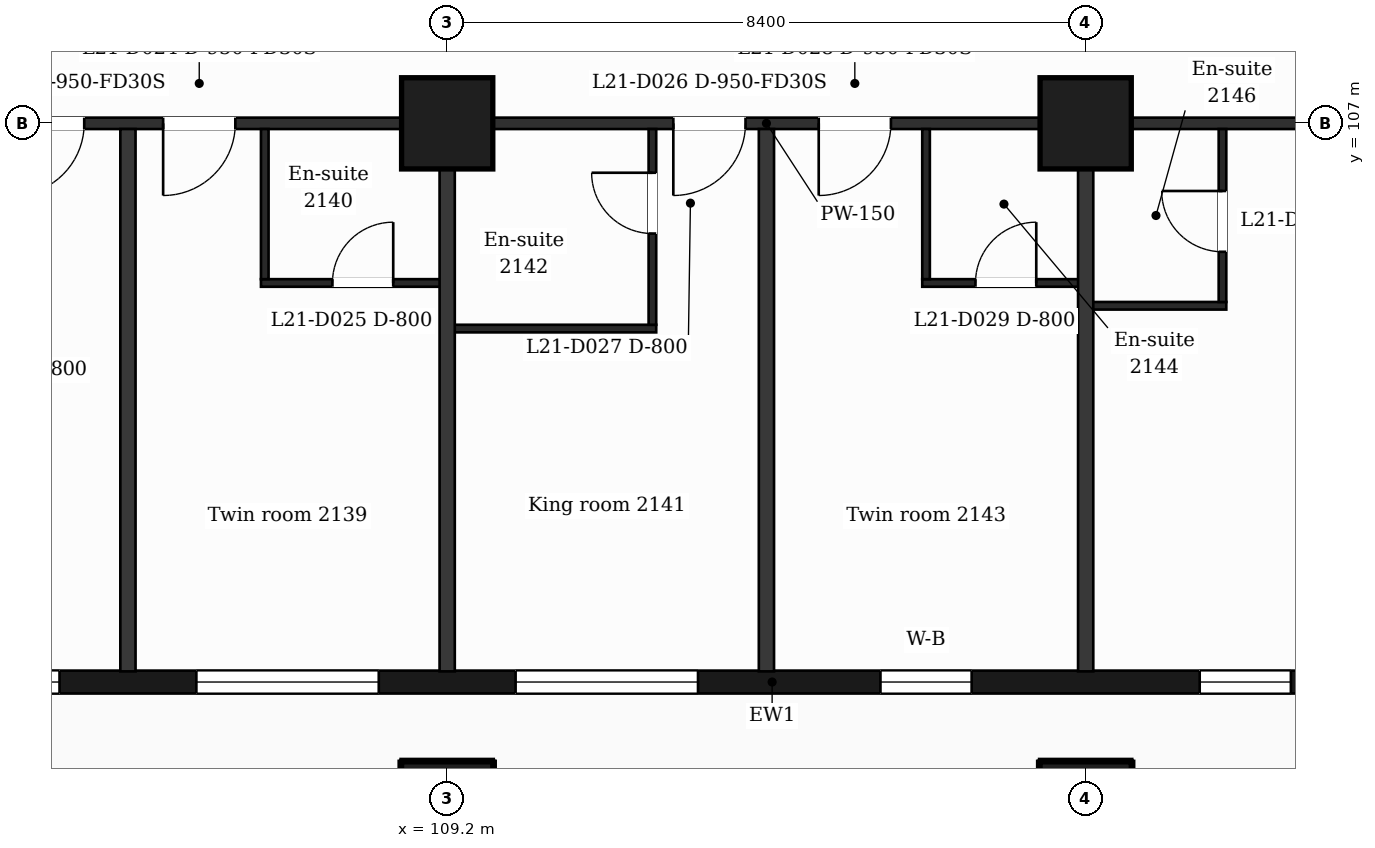
"""IFC4 building model, lengths in metres.
Left out: names, types, materials, properties, quantities, classifications, styles, units other than length and angle.
Written with IfcOpenShell. Run it as: python <this file> out.ifc"""

import sys

from ifc_helpers import new_model, si_unit, direction, frame, frame_2d, origin, origin_2d, place, context, subcontext, project, spatial, rectangle, extrude, element, fill, save


model = new_model("IFC4")
c1 = context("Model", 3, precision=1e-05, world=origin(), true_north=direction((0.0, 1.0)))
c2 = subcontext(c1, "Body", "Model", "MODEL_VIEW")
j1 = project(units=[si_unit("LENGTHUNIT", "METRE"), si_unit("PLANEANGLEUNIT", "RADIAN")], contexts=[c1])
p1 = place(None, origin())
s1 = spatial("IfcSite", under=j1, at=p1, CompositionType="ELEMENT")
p2 = place(p1, origin())
s2 = spatial("IfcBuilding", under=s1, at=p2, CompositionType="ELEMENT")
p3 = place(p2, frame((0.0, 0.0, 94.7)))
s3 = spatial("IfcBuildingStorey", under=s2, at=p3, CompositionType="ELEMENT", Elevation=94.7)
for number, where, z_axis, x_axis in (
    (1, (109.2, 98.0, 0.0), (0.0, 0.0, 1.0), (1.0, 0.0, 0.0)),
    (2, (117.6, 98.0, 0.0), (0.0, 0.0, 1.0), (1.0, 0.0, 0.0)),
    (3, (109.2, 107.0, 0.0), (0.0, 0.0, 1.0), (1.0, 0.0, 0.0)),
    (4, (117.6, 107.0, 0.0), (0.0, 0.0, 1.0), (1.0, 0.0, 0.0)),
):
    element("IfcColumn", number, at=place(p3, frame(where, z_axis=z_axis, x_axis=x_axis)), inside=s3, PredefinedType="COLUMN", context=c2, shape_type="SweptSolid", body=[
        extrude(rectangle(XDim=1.2, YDim=1.2, at=origin_2d()), origin(), (0.0, 0.0, 1.0), 3.7),
    ])
p4 = place(p3, frame((89.85, 99.65, 0.0), z_axis=(0.0, 0.0, 1.0), x_axis=(1.0, 0.0, 0.0)))
e5 = element("IfcWall", 5, at=p4, inside=s3, PredefinedType="SOLIDWALL", context=c2, shape_type="SweptSolid", body=[
    extrude(rectangle(XDim=47.25, YDim=0.3, at=frame_2d((23.625, 0.0))), origin(), (0.0, 0.0, 1.0), 3.38),
])
p5 = place(p4, frame((0.725, 0.0, 0.9)))
e6 = element("IfcOpeningElement", 6, at=p5, cuts=e5, PredefinedType="OPENING", context=c2, shape_type="SweptSolid", body=[
    extrude(rectangle(XDim=1.2, YDim=2.1, at=frame_2d((0.6, 1.05))), frame((0.0, 0.16, 0.0), z_axis=(0.0, -1.0, 0.0), x_axis=(1.0, 0.0, 0.0)), (0.0, 0.0, 1.0), 0.32),
])
p6 = place(p4, frame((3.45, 0.0, 0.9)))
e7 = element("IfcOpeningElement", 7, at=p6, cuts=e5, PredefinedType="OPENING", context=c2, shape_type="SweptSolid", body=[
    extrude(rectangle(XDim=2.4, YDim=2.1, at=frame_2d((1.2, 1.05))), frame((0.0, 0.16, 0.0), z_axis=(0.0, -1.0, 0.0), x_axis=(1.0, 0.0, 0.0)), (0.0, 0.0, 1.0), 0.32),
])
p7 = place(p4, frame((7.65, 0.0, 0.9)))
e8 = element("IfcOpeningElement", 8, at=p7, cuts=e5, PredefinedType="OPENING", context=c2, shape_type="SweptSolid", body=[
    extrude(rectangle(XDim=2.4, YDim=2.1, at=frame_2d((1.2, 1.05))), frame((0.0, 0.16, 0.0), z_axis=(0.0, -1.0, 0.0), x_axis=(1.0, 0.0, 0.0)), (0.0, 0.0, 1.0), 0.32),
])
p8 = place(p4, frame((11.85, 0.0, 0.9)))
e9 = element("IfcOpeningElement", 9, at=p8, cuts=e5, PredefinedType="OPENING", context=c2, shape_type="SweptSolid", body=[
    extrude(rectangle(XDim=2.4, YDim=2.1, at=frame_2d((1.2, 1.05))), frame((0.0, 0.16, 0.0), z_axis=(0.0, -1.0, 0.0), x_axis=(1.0, 0.0, 0.0)), (0.0, 0.0, 1.0), 0.32),
])
p9 = place(p4, frame((16.05, 0.0, 0.9)))
e10 = element("IfcOpeningElement", 10, at=p9, cuts=e5, PredefinedType="OPENING", context=c2, shape_type="SweptSolid", body=[
    extrude(rectangle(XDim=2.4, YDim=2.1, at=frame_2d((1.2, 1.05))), frame((0.0, 0.16, 0.0), z_axis=(0.0, -1.0, 0.0), x_axis=(1.0, 0.0, 0.0)), (0.0, 0.0, 1.0), 0.32),
])
p10 = place(p4, frame((20.25, 0.0, 0.9)))
e11 = element("IfcOpeningElement", 11, at=p10, cuts=e5, PredefinedType="OPENING", context=c2, shape_type="SweptSolid", body=[
    extrude(rectangle(XDim=2.4, YDim=2.1, at=frame_2d((1.2, 1.05))), frame((0.0, 0.16, 0.0), z_axis=(0.0, -1.0, 0.0), x_axis=(1.0, 0.0, 0.0)), (0.0, 0.0, 1.0), 0.32),
])
p11 = place(p4, frame((25.05, 0.0, 0.9)))
e12 = element("IfcOpeningElement", 12, at=p11, cuts=e5, PredefinedType="OPENING", context=c2, shape_type="SweptSolid", body=[
    extrude(rectangle(XDim=1.2, YDim=2.1, at=frame_2d((0.6, 1.05))), frame((0.0, 0.16, 0.0), z_axis=(0.0, -1.0, 0.0), x_axis=(1.0, 0.0, 0.0)), (0.0, 0.0, 1.0), 0.32),
])
p12 = place(p4, frame((29.25, 0.0, 0.9)))
e13 = element("IfcOpeningElement", 13, at=p12, cuts=e5, PredefinedType="OPENING", context=c2, shape_type="SweptSolid", body=[
    extrude(rectangle(XDim=1.2, YDim=2.1, at=frame_2d((0.6, 1.05))), frame((0.0, 0.16, 0.0), z_axis=(0.0, -1.0, 0.0), x_axis=(1.0, 0.0, 0.0)), (0.0, 0.0, 1.0), 0.32),
])
p13 = place(p4, frame((32.55, 0.0, 0.0)))
e14 = element("IfcOpeningElement", 14, at=p13, cuts=e5, PredefinedType="OPENING", context=c2, shape_type="SweptSolid", body=[
    extrude(rectangle(XDim=1.2, YDim=2.4, at=frame_2d((0.6, 1.2))), frame((0.0, 0.16, 0.0), z_axis=(0.0, -1.0, 0.0), x_axis=(1.0, 0.0, 0.0)), (0.0, 0.0, 1.0), 0.32),
])
p14 = place(p4, frame((34.35, 0.0, 0.9)))
e15 = element("IfcOpeningElement", 15, at=p14, cuts=e5, PredefinedType="OPENING", context=c2, shape_type="SweptSolid", body=[
    extrude(rectangle(XDim=1.2, YDim=2.1, at=frame_2d((0.6, 1.05))), frame((0.0, 0.16, 0.0), z_axis=(0.0, -1.0, 0.0), x_axis=(1.0, 0.0, 0.0)), (0.0, 0.0, 1.0), 0.32),
])
p15 = place(p4, frame((37.05, 0.0, 0.9)))
e16 = element("IfcOpeningElement", 16, at=p15, cuts=e5, PredefinedType="OPENING", context=c2, shape_type="SweptSolid", body=[
    extrude(rectangle(XDim=2.4, YDim=2.1, at=frame_2d((1.2, 1.05))), frame((0.0, 0.16, 0.0), z_axis=(0.0, -1.0, 0.0), x_axis=(1.0, 0.0, 0.0)), (0.0, 0.0, 1.0), 0.32),
])
p16 = place(p4, frame((40.95, 0.0, 0.0)))
e17 = element("IfcOpeningElement", 17, at=p16, cuts=e5, PredefinedType="OPENING", context=c2, shape_type="SweptSolid", body=[
    extrude(rectangle(XDim=1.2, YDim=2.4, at=frame_2d((0.6, 1.2))), frame((0.0, 0.16, 0.0), z_axis=(0.0, -1.0, 0.0), x_axis=(1.0, 0.0, 0.0)), (0.0, 0.0, 1.0), 0.32),
])
p17 = place(p4, frame((42.75, 0.0, 0.9)))
e18 = element("IfcOpeningElement", 18, at=p17, cuts=e5, PredefinedType="OPENING", context=c2, shape_type="SweptSolid", body=[
    extrude(rectangle(XDim=1.2, YDim=2.1, at=frame_2d((0.6, 1.05))), frame((0.0, 0.16, 0.0), z_axis=(0.0, -1.0, 0.0), x_axis=(1.0, 0.0, 0.0)), (0.0, 0.0, 1.0), 0.32),
])
p18 = place(p4, frame((45.25, 0.0, 0.9)))
e19 = element("IfcOpeningElement", 19, at=p18, cuts=e5, PredefinedType="OPENING", context=c2, shape_type="SweptSolid", body=[
    extrude(rectangle(XDim=1.2, YDim=2.1, at=frame_2d((0.6, 1.05))), frame((0.0, 0.16, 0.0), z_axis=(0.0, -1.0, 0.0), x_axis=(1.0, 0.0, 0.0)), (0.0, 0.0, 1.0), 0.32),
])
p19 = place(p3, frame((109.2, 104.3, 0.0), z_axis=(0.0, 0.0, 1.0), x_axis=(1.0, 0.0, 0.0)))
e20 = element("IfcWall", 20, at=p19, inside=s3, PredefinedType="PARTITIONING", context=c2, shape_type="SweptSolid", body=[
    extrude(rectangle(XDim=2.75, YDim=0.1, at=frame_2d((1.375, 0.0))), origin(), (0.0, 0.0, 1.0), 3.38),
])
p20 = place(p3, frame((117.6, 104.6, 0.0), z_axis=(0.0, 0.0, 1.0), x_axis=(1.0, 0.0, 0.0)))
e21 = element("IfcWall", 21, at=p20, inside=s3, PredefinedType="PARTITIONING", context=c2, shape_type="SweptSolid", body=[
    extrude(rectangle(XDim=1.85, YDim=0.1, at=frame_2d((0.925, 0.0))), origin(), (0.0, 0.0, 1.0), 3.38),
])
p21 = place(p3, frame((106.75, 104.9, 0.0), z_axis=(0.0, 0.0, 1.0), x_axis=(1.0, 0.0, 0.0)))
e22 = element("IfcWall", 22, at=p21, inside=s3, PredefinedType="PARTITIONING", context=c2, shape_type="SweptSolid", body=[
    extrude(rectangle(XDim=2.45, YDim=0.1, at=frame_2d((1.225, 0.0))), origin(), (0.0, 0.0, 1.0), 3.38),
])
p22 = place(p21, frame((0.94, 0.0, 0.0)))
e23 = element("IfcOpeningElement", 23, at=p22, cuts=e22, PredefinedType="OPENING", context=c2, shape_type="SweptSolid", body=[
    extrude(rectangle(XDim=0.8, YDim=2.1, at=frame_2d((0.4, 1.05))), frame((0.0, 0.06, 0.0), z_axis=(0.0, -1.0, 0.0), x_axis=(1.0, 0.0, 0.0)), (0.0, 0.0, 1.0), 0.12),
])
p23 = place(p3, frame((115.45, 104.9, 0.0), z_axis=(0.0, 0.0, 1.0), x_axis=(1.0, 0.0, 0.0)))
e24 = element("IfcWall", 24, at=p23, inside=s3, PredefinedType="PARTITIONING", context=c2, shape_type="SweptSolid", body=[
    extrude(rectangle(XDim=2.15, YDim=0.1, at=frame_2d((1.075, 0.0))), origin(), (0.0, 0.0, 1.0), 3.38),
])
p24 = place(p23, frame((0.7, 0.0, 0.0)))
e25 = element("IfcOpeningElement", 25, at=p24, cuts=e24, PredefinedType="OPENING", context=c2, shape_type="SweptSolid", body=[
    extrude(rectangle(XDim=0.8, YDim=2.1, at=frame_2d((0.4, 1.05))), frame((0.0, 0.06, 0.0), z_axis=(0.0, -1.0, 0.0), x_axis=(1.0, 0.0, 0.0)), (0.0, 0.0, 1.0), 0.12),
])
p25 = place(p3, frame((87.018, 107.0, 0.0), z_axis=(0.0, 0.0, 1.0), x_axis=(1.0, 0.0, 0.0)))
e26 = element("IfcWall", 26, at=p25, inside=s3, PredefinedType="PARTITIONING", context=c2, shape_type="SweptSolid", body=[
    extrude(rectangle(XDim=52.765, YDim=0.15, at=frame_2d((26.382, 0.0))), origin(), (0.0, 0.0, 1.0), 3.38),
])
p26 = place(p25, frame((0.707, 0.0, 0.0)))
e27 = element("IfcOpeningElement", 27, at=p26, cuts=e26, PredefinedType="OPENING", context=c2, shape_type="SweptSolid", body=[
    extrude(rectangle(XDim=0.95, YDim=2.1, at=frame_2d((0.475, 1.05))), frame((0.0, 0.085, 0.0), z_axis=(0.0, -1.0, 0.0), x_axis=(1.0, 0.0, 0.0)), (0.0, 0.0, 1.0), 0.17),
])
p27 = place(p25, frame((6.982, 0.0, 0.0)))
e28 = element("IfcOpeningElement", 28, at=p27, cuts=e26, PredefinedType="OPENING", context=c2, shape_type="SweptSolid", body=[
    extrude(rectangle(XDim=1.0, YDim=2.1, at=frame_2d((0.5, 1.05))), frame((0.0, 0.085, 0.0), z_axis=(0.0, -1.0, 0.0), x_axis=(1.0, 0.0, 0.0)), (0.0, 0.0, 1.0), 0.17),
])
p28 = place(p25, frame((16.457, 0.0, 0.0)))
e29 = element("IfcOpeningElement", 29, at=p28, cuts=e26, PredefinedType="OPENING", context=c2, shape_type="SweptSolid", body=[
    extrude(rectangle(XDim=0.95, YDim=2.1, at=frame_2d((0.475, 1.05))), frame((0.0, 0.085, 0.0), z_axis=(0.0, -1.0, 0.0), x_axis=(1.0, 0.0, 0.0)), (0.0, 0.0, 1.0), 0.17),
])
p29 = place(p25, frame((18.445, 0.0, 0.0)))
e30 = element("IfcOpeningElement", 30, at=p29, cuts=e26, PredefinedType="OPENING", context=c2, shape_type="SweptSolid", body=[
    extrude(rectangle(XDim=0.95, YDim=2.1, at=frame_2d((0.475, 1.05))), frame((0.0, 0.085, 0.0), z_axis=(0.0, -1.0, 0.0), x_axis=(1.0, 0.0, 0.0)), (0.0, 0.0, 1.0), 0.17),
])
p30 = place(p25, frame((25.157, 0.0, 0.0)))
e31 = element("IfcOpeningElement", 31, at=p30, cuts=e26, PredefinedType="OPENING", context=c2, shape_type="SweptSolid", body=[
    extrude(rectangle(XDim=0.95, YDim=2.1, at=frame_2d((0.475, 1.05))), frame((0.0, 0.085, 0.0), z_axis=(0.0, -1.0, 0.0), x_axis=(1.0, 0.0, 0.0)), (0.0, 0.0, 1.0), 0.17),
])
p31 = place(p25, frame((27.07, 0.0, 0.0)))
e32 = element("IfcOpeningElement", 32, at=p31, cuts=e26, PredefinedType="OPENING", context=c2, shape_type="SweptSolid", body=[
    extrude(rectangle(XDim=0.95, YDim=2.1, at=frame_2d((0.475, 1.05))), frame((0.0, 0.085, 0.0), z_axis=(0.0, -1.0, 0.0), x_axis=(1.0, 0.0, 0.0)), (0.0, 0.0, 1.0), 0.17),
])
p32 = place(p25, frame((34.712, 0.0, 0.0)))
e33 = element("IfcOpeningElement", 33, at=p32, cuts=e26, PredefinedType="OPENING", context=c2, shape_type="SweptSolid", body=[
    extrude(rectangle(XDim=0.95, YDim=2.1, at=frame_2d((0.475, 1.05))), frame((0.0, 0.085, 0.0), z_axis=(0.0, -1.0, 0.0), x_axis=(1.0, 0.0, 0.0)), (0.0, 0.0, 1.0), 0.17),
])
p33 = place(p25, frame((39.807, 0.0, 0.0)))
e34 = element("IfcOpeningElement", 34, at=p33, cuts=e26, PredefinedType="OPENING", context=c2, shape_type="SweptSolid", body=[
    extrude(rectangle(XDim=0.95, YDim=2.1, at=frame_2d((0.475, 1.05))), frame((0.0, 0.085, 0.0), z_axis=(0.0, -1.0, 0.0), x_axis=(1.0, 0.0, 0.0)), (0.0, 0.0, 1.0), 0.17),
])
p34 = place(p25, frame((45.622, 0.0, 0.0)))
e35 = element("IfcOpeningElement", 35, at=p34, cuts=e26, PredefinedType="OPENING", context=c2, shape_type="SweptSolid", body=[
    extrude(rectangle(XDim=0.95, YDim=2.1, at=frame_2d((0.475, 1.05))), frame((0.0, 0.085, 0.0), z_axis=(0.0, -1.0, 0.0), x_axis=(1.0, 0.0, 0.0)), (0.0, 0.0, 1.0), 0.17),
])
p35 = place(p25, frame((48.974, 0.0, 0.0)))
e36 = element("IfcOpeningElement", 36, at=p35, cuts=e26, PredefinedType="OPENING", context=c2, shape_type="SweptSolid", body=[
    extrude(rectangle(XDim=0.95, YDim=2.1, at=frame_2d((0.475, 1.05))), frame((0.0, 0.085, 0.0), z_axis=(0.0, -1.0, 0.0), x_axis=(1.0, 0.0, 0.0)), (0.0, 0.0, 1.0), 0.17),
])
p36 = place(p3, frame((105.0, 99.79, 0.0), z_axis=(0.0, 0.0, 1.0), x_axis=(0.0, 1.0, 0.0)))
e37 = element("IfcWall", 37, at=p36, inside=s3, PredefinedType="PARTITIONING", context=c2, shape_type="SweptSolid", body=[
    extrude(rectangle(XDim=7.135, YDim=0.2, at=frame_2d((3.567, 0.0))), origin(), (0.0, 0.0, 1.0), 3.38),
])
p37 = place(p3, frame((106.8, 104.95, 0.0), z_axis=(0.0, 0.0, 1.0), x_axis=(0.0, 1.0, 0.0)))
e38 = element("IfcWall", 38, at=p37, inside=s3, PredefinedType="PARTITIONING", context=c2, shape_type="SweptSolid", body=[
    extrude(rectangle(XDim=1.975, YDim=0.1, at=frame_2d((0.988, 0.0))), origin(), (0.0, 0.0, 1.0), 3.38),
])
p38 = place(p3, frame((109.2, 99.79, 0.0), z_axis=(0.0, 0.0, 1.0), x_axis=(0.0, 1.0, 0.0)))
e39 = element("IfcWall", 39, at=p38, inside=s3, PredefinedType="PARTITIONING", context=c2, shape_type="SweptSolid", body=[
    extrude(rectangle(XDim=7.135, YDim=0.2, at=frame_2d((3.567, 0.0))), origin(), (0.0, 0.0, 1.0), 3.38),
])
p39 = place(p3, frame((111.9, 104.35, 0.0), z_axis=(0.0, 0.0, 1.0), x_axis=(0.0, 1.0, 0.0)))
e40 = element("IfcWall", 40, at=p39, inside=s3, PredefinedType="PARTITIONING", context=c2, shape_type="SweptSolid", body=[
    extrude(rectangle(XDim=2.575, YDim=0.1, at=frame_2d((1.288, 0.0))), origin(), (0.0, 0.0, 1.0), 3.38),
])
p40 = place(p39, frame((1.2, 0.0, 0.0)))
e41 = element("IfcOpeningElement", 41, at=p40, cuts=e40, PredefinedType="OPENING", context=c2, shape_type="SweptSolid", body=[
    extrude(rectangle(XDim=0.8, YDim=2.1, at=frame_2d((0.4, 1.05))), frame((0.0, 0.06, 0.0), z_axis=(0.0, -1.0, 0.0), x_axis=(1.0, 0.0, 0.0)), (0.0, 0.0, 1.0), 0.12),
])
p41 = place(p3, frame((113.4, 99.79, 0.0), z_axis=(0.0, 0.0, 1.0), x_axis=(0.0, 1.0, 0.0)))
e42 = element("IfcWall", 42, at=p41, inside=s3, PredefinedType="PARTITIONING", context=c2, shape_type="SweptSolid", body=[
    extrude(rectangle(XDim=7.135, YDim=0.2, at=frame_2d((3.567, 0.0))), origin(), (0.0, 0.0, 1.0), 3.38),
])
p42 = place(p3, frame((115.5, 104.95, 0.0), z_axis=(0.0, 0.0, 1.0), x_axis=(0.0, 1.0, 0.0)))
e43 = element("IfcWall", 43, at=p42, inside=s3, PredefinedType="PARTITIONING", context=c2, shape_type="SweptSolid", body=[
    extrude(rectangle(XDim=1.975, YDim=0.1, at=frame_2d((0.988, 0.0))), origin(), (0.0, 0.0, 1.0), 3.38),
])
p43 = place(p3, frame((117.6, 99.79, 0.0), z_axis=(0.0, 0.0, 1.0), x_axis=(0.0, 1.0, 0.0)))
e44 = element("IfcWall", 44, at=p43, inside=s3, PredefinedType="PARTITIONING", context=c2, shape_type="SweptSolid", body=[
    extrude(rectangle(XDim=7.135, YDim=0.2, at=frame_2d((3.567, 0.0))), origin(), (0.0, 0.0, 1.0), 3.38),
])
p44 = place(p3, frame((119.4, 104.65, 0.0), z_axis=(0.0, 0.0, 1.0), x_axis=(0.0, 1.0, 0.0)))
e45 = element("IfcWall", 45, at=p44, inside=s3, PredefinedType="PARTITIONING", context=c2, shape_type="SweptSolid", body=[
    extrude(rectangle(XDim=2.275, YDim=0.1, at=frame_2d((1.138, 0.0))), origin(), (0.0, 0.0, 1.0), 3.38),
])
p45 = place(p44, frame((0.66, 0.0, 0.0)))
e46 = element("IfcOpeningElement", 46, at=p45, cuts=e45, PredefinedType="OPENING", context=c2, shape_type="SweptSolid", body=[
    extrude(rectangle(XDim=0.8, YDim=2.1, at=frame_2d((0.4, 1.05))), frame((0.0, 0.06, 0.0), z_axis=(0.0, -1.0, 0.0), x_axis=(1.0, 0.0, 0.0)), (0.0, 0.0, 1.0), 0.12),
])
p46 = place(p8, origin())
e47 = element("IfcWindow", 47, at=p46, inside=s3, PartitioningType="SINGLE_PANEL", PredefinedType="WINDOW", context=c2, shape_type="SweptSolid", body=[
    extrude(rectangle(XDim=2.4, YDim=2.1, at=frame_2d((1.2, 1.05))), frame((0.0, 0.03, 0.0), z_axis=(0.0, -1.0, 0.0), x_axis=(1.0, 0.0, 0.0)), (0.0, 0.0, 1.0), 0.06),
])
fill(e9, e47)
p47 = place(p9, origin())
e48 = element("IfcWindow", 48, at=p47, inside=s3, PartitioningType="SINGLE_PANEL", PredefinedType="WINDOW", context=c2, shape_type="SweptSolid", body=[
    extrude(rectangle(XDim=2.4, YDim=2.1, at=frame_2d((1.2, 1.05))), frame((0.0, 0.03, 0.0), z_axis=(0.0, -1.0, 0.0), x_axis=(1.0, 0.0, 0.0)), (0.0, 0.0, 1.0), 0.06),
])
fill(e10, e48)
p48 = place(p10, origin())
e49 = element("IfcWindow", 49, at=p48, inside=s3, PartitioningType="SINGLE_PANEL", PredefinedType="WINDOW", context=c2, shape_type="SweptSolid", body=[
    extrude(rectangle(XDim=2.4, YDim=2.1, at=frame_2d((1.2, 1.05))), frame((0.0, 0.03, 0.0), z_axis=(0.0, -1.0, 0.0), x_axis=(1.0, 0.0, 0.0)), (0.0, 0.0, 1.0), 0.06),
])
fill(e11, e49)
p49 = place(p11, origin())
e50 = element("IfcWindow", 50, at=p49, inside=s3, PartitioningType="SINGLE_PANEL", PredefinedType="WINDOW", context=c2, shape_type="SweptSolid", body=[
    extrude(rectangle(XDim=1.2, YDim=2.1, at=frame_2d((0.6, 1.05))), frame((0.0, 0.03, 0.0), z_axis=(0.0, -1.0, 0.0), x_axis=(1.0, 0.0, 0.0)), (0.0, 0.0, 1.0), 0.06),
])
fill(e12, e50)
p50 = place(p12, origin())
e51 = element("IfcWindow", 51, at=p50, inside=s3, PartitioningType="SINGLE_PANEL", PredefinedType="WINDOW", context=c2, shape_type="SweptSolid", body=[
    extrude(rectangle(XDim=1.2, YDim=2.1, at=frame_2d((0.6, 1.05))), frame((0.0, 0.03, 0.0), z_axis=(0.0, -1.0, 0.0), x_axis=(1.0, 0.0, 0.0)), (0.0, 0.0, 1.0), 0.06),
])
fill(e13, e51)
p51 = place(p28, origin())
e52 = element("IfcDoor", 52, at=p51, inside=s3, OperationType="SINGLE_SWING_LEFT", PredefinedType="DOOR", context=c2, shape_type="SweptSolid", body=[
    extrude(rectangle(XDim=0.95, YDim=2.1, at=frame_2d((0.475, 1.05))), frame((0.0, 0.025, 0.0), z_axis=(0.0, -1.0, 0.0), x_axis=(1.0, 0.0, 0.0)), (0.0, 0.0, 1.0), 0.05),
])
fill(e29, e52)
p52 = place(p29, origin())
e53 = element("IfcDoor", 53, at=p52, inside=s3, OperationType="SINGLE_SWING_LEFT", PredefinedType="DOOR", context=c2, shape_type="SweptSolid", body=[
    extrude(rectangle(XDim=0.95, YDim=2.1, at=frame_2d((0.475, 1.05))), frame((0.0, 0.025, 0.0), z_axis=(0.0, -1.0, 0.0), x_axis=(1.0, 0.0, 0.0)), (0.0, 0.0, 1.0), 0.05),
])
fill(e30, e53)
p53 = place(p22, origin())
e54 = element("IfcDoor", 54, at=p53, inside=s3, OperationType="SINGLE_SWING_RIGHT", PredefinedType="DOOR", context=c2, shape_type="SweptSolid", body=[
    extrude(rectangle(XDim=0.8, YDim=2.1, at=frame_2d((0.4, 1.05))), frame((0.0, 0.025, 0.0), z_axis=(0.0, -1.0, 0.0), x_axis=(1.0, 0.0, 0.0)), (0.0, 0.0, 1.0), 0.05),
])
fill(e23, e54)
p54 = place(p30, origin())
e55 = element("IfcDoor", 55, at=p54, inside=s3, OperationType="SINGLE_SWING_LEFT", PredefinedType="DOOR", context=c2, shape_type="SweptSolid", body=[
    extrude(rectangle(XDim=0.95, YDim=2.1, at=frame_2d((0.475, 1.05))), frame((0.0, 0.025, 0.0), z_axis=(0.0, -1.0, 0.0), x_axis=(1.0, 0.0, 0.0)), (0.0, 0.0, 1.0), 0.05),
])
fill(e31, e55)
p55 = place(p40, origin())
e56 = element("IfcDoor", 56, at=p55, inside=s3, OperationType="SINGLE_SWING_RIGHT", PredefinedType="DOOR", context=c2, shape_type="SweptSolid", body=[
    extrude(rectangle(XDim=0.8, YDim=2.1, at=frame_2d((0.4, 1.05))), frame((0.0, 0.025, 0.0), z_axis=(0.0, -1.0, 0.0), x_axis=(1.0, 0.0, 0.0)), (0.0, 0.0, 1.0), 0.05),
])
fill(e41, e56)
p56 = place(p31, origin())
e57 = element("IfcDoor", 57, at=p56, inside=s3, OperationType="SINGLE_SWING_LEFT", PredefinedType="DOOR", context=c2, shape_type="SweptSolid", body=[
    extrude(rectangle(XDim=0.95, YDim=2.1, at=frame_2d((0.475, 1.05))), frame((0.0, 0.025, 0.0), z_axis=(0.0, -1.0, 0.0), x_axis=(1.0, 0.0, 0.0)), (0.0, 0.0, 1.0), 0.05),
])
fill(e32, e57)
p57 = place(p24, origin())
e58 = element("IfcDoor", 58, at=p57, inside=s3, OperationType="SINGLE_SWING_RIGHT", PredefinedType="DOOR", context=c2, shape_type="SweptSolid", body=[
    extrude(rectangle(XDim=0.8, YDim=2.1, at=frame_2d((0.4, 1.05))), frame((0.0, 0.025, 0.0), z_axis=(0.0, -1.0, 0.0), x_axis=(1.0, 0.0, 0.0)), (0.0, 0.0, 1.0), 0.05),
])
fill(e25, e58)
p58 = place(p45, origin())
e59 = element("IfcDoor", 59, at=p58, inside=s3, OperationType="SINGLE_SWING_RIGHT", PredefinedType="DOOR", context=c2, shape_type="SweptSolid", body=[
    extrude(rectangle(XDim=0.8, YDim=2.1, at=frame_2d((0.4, 1.05))), frame((0.0, 0.025, 0.0), z_axis=(0.0, -1.0, 0.0), x_axis=(1.0, 0.0, 0.0)), (0.0, 0.0, 1.0), 0.05),
])
fill(e46, e59)
save(model, sys.argv[1])
